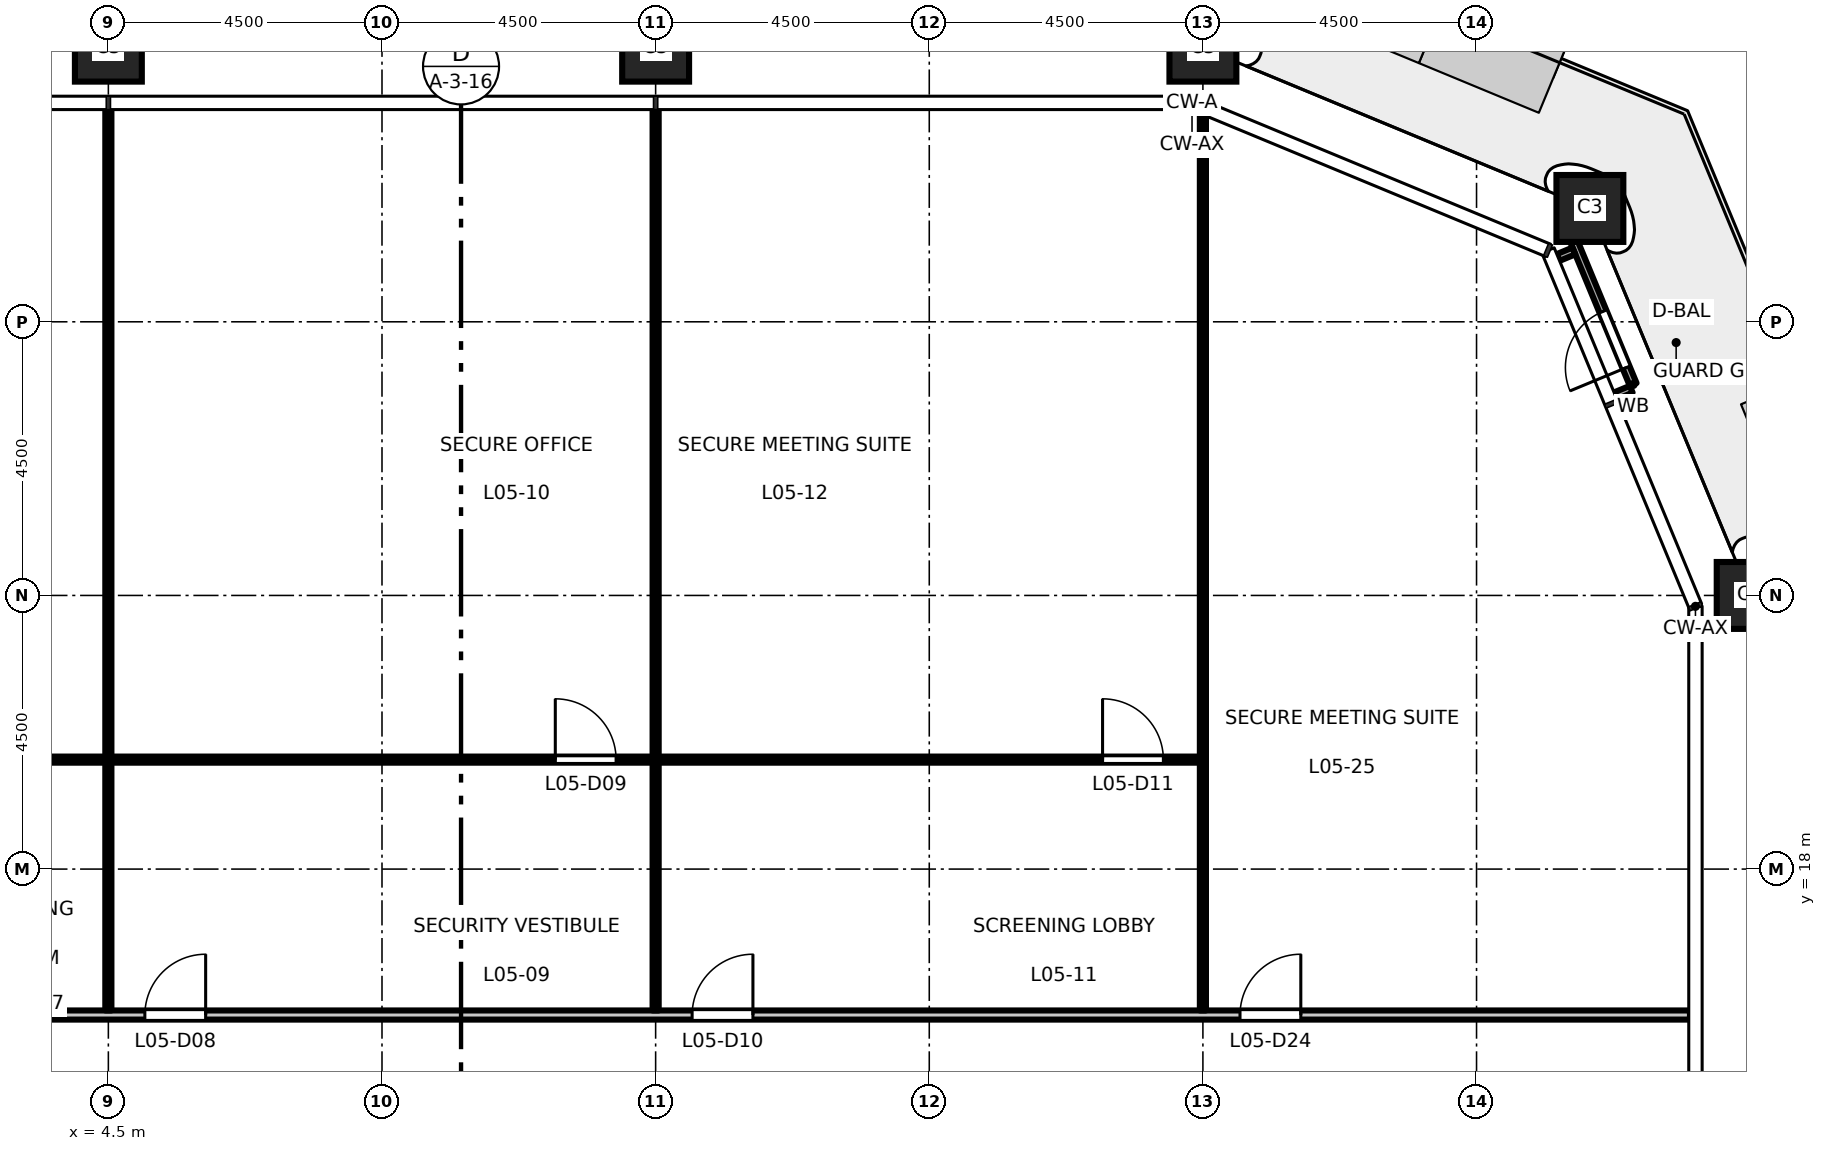
"""IFC4 building model, lengths in metres.
Left out: names, types, materials, properties, quantities, classifications, styles, units other than length and angle.
Written with IfcOpenShell. Run it as: python <this file> out.ifc"""

import sys

from ifc_helpers import new_model, si_unit, direction, frame, frame_2d, origin, origin_2d, place, context, subcontext, project, spatial, rectangle, hollow_rectangle, extrude, element, fill, save


model = new_model("IFC4")
c1 = context("Model", 3, precision=1e-05, world=origin(), true_north=direction((0.0, 1.0)))
c2 = subcontext(c1, "Body", "Model", "MODEL_VIEW")
j1 = project(units=[si_unit("LENGTHUNIT", "METRE"), si_unit("PLANEANGLEUNIT", "RADIAN")], contexts=[c1])
p1 = place(None, origin())
s1 = spatial("IfcSite", under=j1, at=p1, CompositionType="ELEMENT")
p2 = place(p1, origin())
s2 = spatial("IfcBuilding", under=s1, at=p2, CompositionType="ELEMENT")
p3 = place(p2, frame((0.0, 0.0, 26.7)))
s3 = spatial("IfcBuildingStorey", under=s2, at=p3, CompositionType="ELEMENT", Elevation=26.7)
for number, where, z_axis, x_axis in (
    (1, (31.5, 22.5, 0.0), (0.0, 0.0, 1.0), (1.0, 0.0, 0.0)),
    (2, (28.864, 28.864, 0.0), (0.0, 0.0, 1.0), (1.0, 0.0, 0.0)),
    (3, (22.5, 31.5, 0.0), (0.0, 0.0, 1.0), (1.0, 0.0, 0.0)),
    (4, (13.5, 31.5, 0.0), (0.0, 0.0, 1.0), (1.0, 0.0, 0.0)),
    (5, (4.5, 31.5, 0.0), (0.0, 0.0, 1.0), (1.0, 0.0, 0.0)),
):
    element("IfcColumn", number, at=place(p3, frame(where, z_axis=z_axis, x_axis=x_axis)), inside=s3, PredefinedType="COLUMN", context=c2, shape_type="SweptSolid", body=[
        extrude(hollow_rectangle(XDim=1.1, YDim=1.1, WallThickness=0.07, at=origin_2d()), origin(), (0.0, 0.0, 1.0), 4.5),
    ])
p4 = place(p3, frame((29.285, 25.783, 0.0), z_axis=(0.0, 0.0, 1.0), x_axis=(0.923772220778, 0.382942403136, 0.0)))
e6 = element("IfcWall", 6, at=p4, inside=s3, PredefinedType="STANDARD", context=c2, shape_type="SweptSolid", body=[
    extrude(rectangle(XDim=0.28, YDim=0.12, at=frame_2d((0.14, 0.0))), origin(), (0.0, 0.0, 1.0), 4.35),
])
p5 = place(p3, frame((28.343, 28.058, 0.0), z_axis=(0.0, 0.0, 1.0), x_axis=(0.923899985553, 0.382634050621, 0.0)))
e7 = element("IfcWall", 7, at=p5, inside=s3, PredefinedType="STANDARD", context=c2, shape_type="SweptSolid", body=[
    extrude(rectangle(XDim=0.28, YDim=0.12, at=frame_2d((0.14, 0.0))), origin(), (0.0, 0.0, 1.0), 4.35),
])
p6 = place(p3, frame((29.576, 25.969, 0.0), z_axis=(0.0, 0.0, 1.0), x_axis=(-0.382640634603, 0.923897258763, 0.0)))
e8 = element("IfcWall", 8, at=p6, inside=s3, PredefinedType="STANDARD", context=c2, shape_type="SweptSolid", body=[
    extrude(rectangle(XDim=2.538, YDim=0.12, at=frame_2d((1.269, 0.0))), origin(), (0.0, 0.0, 1.0), 4.35),
])
p7 = place(p6, frame((0.3, 0.0, 0.0)))
e9 = element("IfcOpeningElement", 9, at=p7, cuts=e8, PredefinedType="OPENING", context=c2, shape_type="SweptSolid", body=[
    extrude(rectangle(XDim=1.0, YDim=2.4, at=frame_2d((0.5, 1.2))), frame((0.0, 0.07, 0.0), z_axis=(0.0, -1.0, 0.0), x_axis=(1.0, 0.0, 0.0)), (0.0, 0.0, 1.0), 0.14),
])
p8 = place(p3, frame((-30.51, 15.6, 0.0), z_axis=(0.0, 0.0, 1.0), x_axis=(1.0, 0.0, 0.0)))
e10 = element("IfcWall", 10, at=p8, inside=s3, PredefinedType="PARTITIONING", context=c2, shape_type="SweptSolid", body=[
    extrude(rectangle(XDim=61.02, YDim=0.15, at=frame_2d((30.51, 0.0))), origin(), (0.0, 0.0, 1.0), 4.35),
])
p9 = place(p8, frame((15.36, 0.0, 0.0)))
e11 = element("IfcOpeningElement", 11, at=p9, cuts=e10, PredefinedType="OPENING", context=c2, shape_type="SweptSolid", body=[
    extrude(rectangle(XDim=1.0, YDim=2.1, at=frame_2d((0.5, 1.05))), frame((0.0, 0.085, 0.0), z_axis=(0.0, -1.0, 0.0), x_axis=(1.0, 0.0, 0.0)), (0.0, 0.0, 1.0), 0.17),
])
p10 = place(p8, frame((24.36, 0.0, 0.0)))
e12 = element("IfcOpeningElement", 12, at=p10, cuts=e10, PredefinedType="OPENING", context=c2, shape_type="SweptSolid", body=[
    extrude(rectangle(XDim=1.0, YDim=2.1, at=frame_2d((0.5, 1.05))), frame((0.0, 0.085, 0.0), z_axis=(0.0, -1.0, 0.0), x_axis=(1.0, 0.0, 0.0)), (0.0, 0.0, 1.0), 0.17),
])
p11 = place(p8, frame((28.86, 0.0, 0.0)))
e13 = element("IfcOpeningElement", 13, at=p11, cuts=e10, PredefinedType="OPENING", context=c2, shape_type="SweptSolid", body=[
    extrude(rectangle(XDim=1.0, YDim=2.1, at=frame_2d((0.5, 1.05))), frame((0.0, 0.085, 0.0), z_axis=(0.0, -1.0, 0.0), x_axis=(1.0, 0.0, 0.0)), (0.0, 0.0, 1.0), 0.17),
])
p12 = place(p8, frame((31.11, 0.0, 0.0)))
e14 = element("IfcOpeningElement", 14, at=p12, cuts=e10, PredefinedType="OPENING", context=c2, shape_type="SweptSolid", body=[
    extrude(rectangle(XDim=1.0, YDim=2.1, at=frame_2d((0.5, 1.05))), frame((0.0, 0.085, 0.0), z_axis=(0.0, -1.0, 0.0), x_axis=(1.0, 0.0, 0.0)), (0.0, 0.0, 1.0), 0.17),
])
p13 = place(p8, frame((35.61, 0.0, 0.0)))
e15 = element("IfcOpeningElement", 15, at=p13, cuts=e10, PredefinedType="OPENING", context=c2, shape_type="SweptSolid", body=[
    extrude(rectangle(XDim=1.0, YDim=2.1, at=frame_2d((0.5, 1.05))), frame((0.0, 0.085, 0.0), z_axis=(0.0, -1.0, 0.0), x_axis=(1.0, 0.0, 0.0)), (0.0, 0.0, 1.0), 0.17),
])
p14 = place(p8, frame((44.61, 0.0, 0.0)))
e16 = element("IfcOpeningElement", 16, at=p14, cuts=e10, PredefinedType="OPENING", context=c2, shape_type="SweptSolid", body=[
    extrude(rectangle(XDim=1.0, YDim=2.1, at=frame_2d((0.5, 1.05))), frame((0.0, 0.085, 0.0), z_axis=(0.0, -1.0, 0.0), x_axis=(1.0, 0.0, 0.0)), (0.0, 0.0, 1.0), 0.17),
])
p15 = place(p8, frame((0.61, 0.0, 0.0)))
e17 = element("IfcOpeningElement", 17, at=p15, cuts=e10, PredefinedType="OPENING", context=c2, shape_type="SweptSolid", body=[
    extrude(rectangle(XDim=1.0, YDim=2.1, at=frame_2d((0.5, 1.05))), frame((0.0, 0.085, 0.0), z_axis=(0.0, -1.0, 0.0), x_axis=(1.0, 0.0, 0.0)), (0.0, 0.0, 1.0), 0.17),
])
p16 = place(p8, frame((53.62, 0.0, 0.0)))
e18 = element("IfcOpeningElement", 18, at=p16, cuts=e10, PredefinedType="OPENING", context=c2, shape_type="SweptSolid", body=[
    extrude(rectangle(XDim=1.0, YDim=2.1, at=frame_2d((0.5, 1.05))), frame((0.0, 0.085, 0.0), z_axis=(0.0, -1.0, 0.0), x_axis=(1.0, 0.0, 0.0)), (0.0, 0.0, 1.0), 0.17),
])
p17 = place(p3, frame((-30.51, 19.8, 0.0), z_axis=(0.0, 0.0, 1.0), x_axis=(1.0, 0.0, 0.0)))
e19 = element("IfcWall", 19, at=p17, inside=s3, PredefinedType="PARTITIONING", context=c2, shape_type="SweptSolid", body=[
    extrude(rectangle(XDim=52.96, YDim=0.1, at=frame_2d((26.48, 0.0))), origin(), (0.0, 0.0, 1.0), 4.35),
])
p18 = place(p17, frame((8.61, 0.0, 0.0)))
e20 = element("IfcOpeningElement", 20, at=p18, cuts=e19, PredefinedType="OPENING", context=c2, shape_type="SweptSolid", body=[
    extrude(rectangle(XDim=1.0, YDim=2.1, at=frame_2d((0.5, 1.05))), frame((0.0, 0.06, 0.0), z_axis=(0.0, -1.0, 0.0), x_axis=(1.0, 0.0, 0.0)), (0.0, 0.0, 1.0), 0.12),
])
p19 = place(p17, frame((17.61, 0.0, 0.0)))
e21 = element("IfcOpeningElement", 21, at=p19, cuts=e19, PredefinedType="OPENING", context=c2, shape_type="SweptSolid", body=[
    extrude(rectangle(XDim=1.0, YDim=2.1, at=frame_2d((0.5, 1.05))), frame((0.0, 0.06, 0.0), z_axis=(0.0, -1.0, 0.0), x_axis=(1.0, 0.0, 0.0)), (0.0, 0.0, 1.0), 0.12),
])
p20 = place(p17, frame((28.86, 0.0, 0.0)))
e22 = element("IfcOpeningElement", 22, at=p20, cuts=e19, PredefinedType="OPENING", context=c2, shape_type="SweptSolid", body=[
    extrude(rectangle(XDim=1.0, YDim=2.1, at=frame_2d((0.5, 1.05))), frame((0.0, 0.06, 0.0), z_axis=(0.0, -1.0, 0.0), x_axis=(1.0, 0.0, 0.0)), (0.0, 0.0, 1.0), 0.12),
])
p21 = place(p17, frame((42.36, 0.0, 0.0)))
e23 = element("IfcOpeningElement", 23, at=p21, cuts=e19, PredefinedType="OPENING", context=c2, shape_type="SweptSolid", body=[
    extrude(rectangle(XDim=1.0, YDim=2.1, at=frame_2d((0.5, 1.05))), frame((0.0, 0.06, 0.0), z_axis=(0.0, -1.0, 0.0), x_axis=(1.0, 0.0, 0.0)), (0.0, 0.0, 1.0), 0.12),
])
p22 = place(p17, frame((51.36, 0.0, 0.0)))
e24 = element("IfcOpeningElement", 24, at=p22, cuts=e19, PredefinedType="OPENING", context=c2, shape_type="SweptSolid", body=[
    extrude(rectangle(XDim=1.0, YDim=2.1, at=frame_2d((0.5, 1.05))), frame((0.0, 0.06, 0.0), z_axis=(0.0, -1.0, 0.0), x_axis=(1.0, 0.0, 0.0)), (0.0, 0.0, 1.0), 0.12),
])
p23 = place(p17, frame((6.36, 0.0, 0.0)))
e25 = element("IfcOpeningElement", 25, at=p23, cuts=e19, PredefinedType="OPENING", context=c2, shape_type="SweptSolid", body=[
    extrude(rectangle(XDim=1.0, YDim=2.1, at=frame_2d((0.5, 1.05))), frame((0.0, 0.06, 0.0), z_axis=(0.0, -1.0, 0.0), x_axis=(1.0, 0.0, 0.0)), (0.0, 0.0, 1.0), 0.12),
])
p24 = place(p3, frame((4.5, 15.675, 0.0), z_axis=(0.0, 0.0, 1.0), x_axis=(0.0, 1.0, 0.0)))
e26 = element("IfcWall", 26, at=p24, inside=s3, PredefinedType="PARTITIONING", context=c2, shape_type="SweptSolid", body=[
    extrude(rectangle(XDim=4.075, YDim=0.1, at=frame_2d((2.038, 0.0))), origin(), (0.0, 0.0, 1.0), 3.35),
])
p25 = place(p3, frame((4.5, 19.85, 0.0), z_axis=(0.0, 0.0, 1.0), x_axis=(0.0, 1.0, 0.0)))
e27 = element("IfcWall", 27, at=p25, inside=s3, PredefinedType="PARTITIONING", context=c2, shape_type="SweptSolid", body=[
    extrude(rectangle(XDim=10.66, YDim=0.1, at=frame_2d((5.33, 0.0))), origin(), (0.0, 0.0, 1.0), 3.35),
])
p26 = place(p3, frame((13.5, 15.675, 0.0), z_axis=(0.0, 0.0, 1.0), x_axis=(0.0, 1.0, 0.0)))
e28 = element("IfcWall", 28, at=p26, inside=s3, PredefinedType="PARTITIONING", context=c2, shape_type="SweptSolid", body=[
    extrude(rectangle(XDim=4.075, YDim=0.1, at=frame_2d((2.038, 0.0))), origin(), (0.0, 0.0, 1.0), 3.35),
])
p27 = place(p3, frame((13.5, 19.85, 0.0), z_axis=(0.0, 0.0, 1.0), x_axis=(0.0, 1.0, 0.0)))
e29 = element("IfcWall", 29, at=p27, inside=s3, PredefinedType="PARTITIONING", context=c2, shape_type="SweptSolid", body=[
    extrude(rectangle(XDim=10.66, YDim=0.1, at=frame_2d((5.33, 0.0))), origin(), (0.0, 0.0, 1.0), 3.35),
])
p28 = place(p3, frame((22.5, 15.675, 0.0), z_axis=(0.0, 0.0, 1.0), x_axis=(0.0, 1.0, 0.0)))
e30 = element("IfcWall", 30, at=p28, inside=s3, PredefinedType="PARTITIONING", context=c2, shape_type="SweptSolid", body=[
    extrude(rectangle(XDim=14.753, YDim=0.1, at=frame_2d((7.376, 0.0))), origin(), (0.0, 0.0, 1.0), 3.35),
])
p29 = place(p7, origin())
e31 = element("IfcDoor", 31, at=p29, inside=s3, OperationType="SINGLE_SWING_LEFT", PredefinedType="DOOR", context=c2, shape_type="SweptSolid", body=[
    extrude(rectangle(XDim=1.0, YDim=2.4, at=frame_2d((0.5, 1.2))), frame((0.0, 0.025, 0.0), z_axis=(0.0, -1.0, 0.0), x_axis=(1.0, 0.0, 0.0)), (0.0, 0.0, 1.0), 0.05),
])
fill(e9, e31)
p30 = place(p13, origin())
e32 = element("IfcDoor", 32, at=p30, inside=s3, OperationType="SINGLE_SWING_RIGHT", PredefinedType="DOOR", context=c2, shape_type="SweptSolid", body=[
    extrude(rectangle(XDim=1.0, YDim=2.1, at=frame_2d((0.5, 1.05))), frame((0.0, 0.025, 0.0), z_axis=(0.0, -1.0, 0.0), x_axis=(1.0, 0.0, 0.0)), (0.0, 0.0, 1.0), 0.05),
])
fill(e15, e32)
p31 = place(p21, origin())
e33 = element("IfcDoor", 33, at=p31, inside=s3, OperationType="SINGLE_SWING_LEFT", PredefinedType="DOOR", context=c2, shape_type="SweptSolid", body=[
    extrude(rectangle(XDim=1.0, YDim=2.1, at=frame_2d((0.5, 1.05))), frame((0.0, 0.025, 0.0), z_axis=(0.0, -1.0, 0.0), x_axis=(1.0, 0.0, 0.0)), (0.0, 0.0, 1.0), 0.05),
])
fill(e23, e33)
p32 = place(p14, origin())
e34 = element("IfcDoor", 34, at=p32, inside=s3, OperationType="SINGLE_SWING_RIGHT", PredefinedType="DOOR", context=c2, shape_type="SweptSolid", body=[
    extrude(rectangle(XDim=1.0, YDim=2.1, at=frame_2d((0.5, 1.05))), frame((0.0, 0.025, 0.0), z_axis=(0.0, -1.0, 0.0), x_axis=(1.0, 0.0, 0.0)), (0.0, 0.0, 1.0), 0.05),
])
fill(e16, e34)
p33 = place(p22, origin())
e35 = element("IfcDoor", 35, at=p33, inside=s3, OperationType="SINGLE_SWING_LEFT", PredefinedType="DOOR", context=c2, shape_type="SweptSolid", body=[
    extrude(rectangle(XDim=1.0, YDim=2.1, at=frame_2d((0.5, 1.05))), frame((0.0, 0.025, 0.0), z_axis=(0.0, -1.0, 0.0), x_axis=(1.0, 0.0, 0.0)), (0.0, 0.0, 1.0), 0.05),
])
fill(e24, e35)
p34 = place(p16, origin())
e36 = element("IfcDoor", 36, at=p34, inside=s3, OperationType="SINGLE_SWING_RIGHT", PredefinedType="DOOR", context=c2, shape_type="SweptSolid", body=[
    extrude(rectangle(XDim=1.0, YDim=2.1, at=frame_2d((0.5, 1.05))), frame((0.0, 0.025, 0.0), z_axis=(0.0, -1.0, 0.0), x_axis=(1.0, 0.0, 0.0)), (0.0, 0.0, 1.0), 0.05),
])
fill(e18, e36)
save(model, sys.argv[1])
